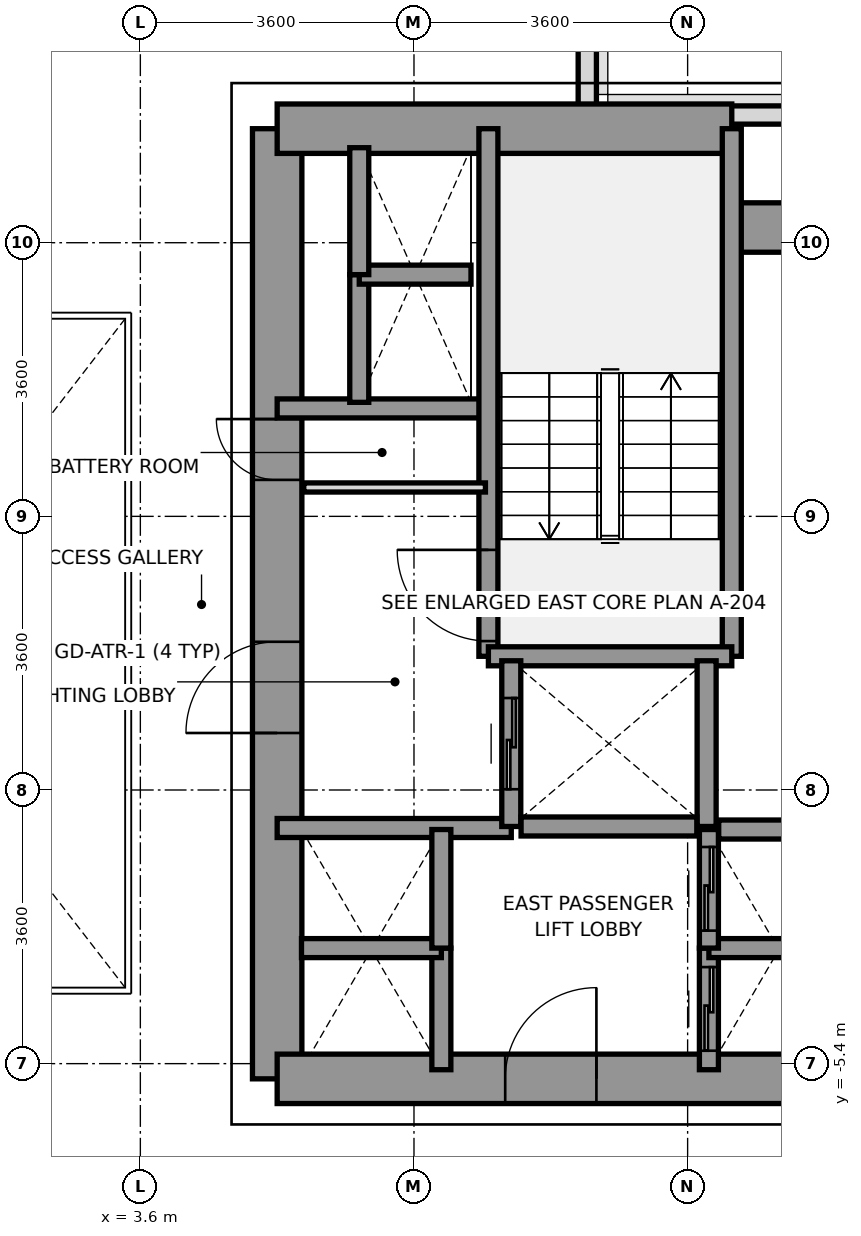
"""IFC4 building model, lengths in metres.
Left out: names, types, materials, properties, quantities, classifications, styles, units other than length and angle.
Written with IfcOpenShell. Run it as: python <this file> out.ifc"""

import sys

from ifc_helpers import new_model, si_unit, direction, frame, frame_2d, origin, place, context, subcontext, project, spatial, rectangle, extrude, source, transform, mapped, element, fill, save


model = new_model("IFC4")
c1 = context("Model", 3, precision=1e-05, world=origin(), true_north=direction((0.0, 1.0)))
c2 = subcontext(c1, "Body", "Model", "MODEL_VIEW")
j1 = project(units=[si_unit("LENGTHUNIT", "METRE"), si_unit("PLANEANGLEUNIT", "RADIAN")], contexts=[c1])
p1 = place(None, origin())
s1 = spatial("IfcSite", under=j1, at=p1, CompositionType="ELEMENT")
p2 = place(p1, origin())
s2 = spatial("IfcBuilding", under=s1, at=p2, CompositionType="ELEMENT")
p3 = place(p2, frame((0.0, 0.0, 25.2)))
s3 = spatial("IfcBuildingStorey", under=s2, at=p3, CompositionType="ELEMENT", Elevation=25.2)
p4 = place(p3, frame((9.48, 8.789, 0.0), z_axis=(0.0, 0.0, 1.0), x_axis=(0.0, -1.0, 0.0)))
e1 = element("IfcWall", 1, at=p4, inside=s3, PredefinedType="PARAPET", context=c2, shape_type="SweptSolid", body=[
    extrude(rectangle(XDim=1.836, YDim=0.24, at=frame_2d((0.918, 0.0))), origin(), (0.0, 0.0, 1.0), 1.15),
])
p5 = place(p3, frame((11.295, 7.08, 0.0), z_axis=(0.0, 0.0, 1.0), x_axis=(1.0, 0.0, 0.0)))
e2 = element("IfcWall", 2, at=p5, inside=s3, PredefinedType="PARAPET", context=c2, shape_type="SweptSolid", body=[
    extrude(rectangle(XDim=2.727, YDim=0.24, at=frame_2d((1.364, 0.0))), origin(), (0.0, 0.0, 1.0), 1.15),
])
p6 = place(p3, frame((5.4, -5.6, 0.0), z_axis=(0.0, 0.0, 1.0), x_axis=(0.0, 1.0, 0.0)))
e3 = element("IfcWall", 3, at=p6, inside=s3, PredefinedType="SHEAR", context=c2, shape_type="SweptSolid", body=[
    extrude(rectangle(XDim=12.5, YDim=0.65, at=frame_2d((6.25, 0.0))), origin(), (0.0, 0.0, 1.0), 5.2),
])
p7 = place(p6, frame((4.55, 0.0, 0.0)))
e4 = element("IfcOpeningElement", 4, at=p7, cuts=e3, PredefinedType="OPENING", context=c2, shape_type="SweptSolid", body=[
    extrude(rectangle(XDim=1.2, YDim=2.2, at=frame_2d((0.6, 1.1))), frame((0.0, 0.335, 0.0), z_axis=(0.0, -1.0, 0.0), x_axis=(1.0, 0.0, 0.0)), (0.0, 0.0, 1.0), 0.67),
])
p8 = place(p6, frame((7.88, 0.0, 0.0)))
e5 = element("IfcOpeningElement", 5, at=p8, cuts=e3, PredefinedType="OPENING", context=c2, shape_type="SweptSolid", body=[
    extrude(rectangle(XDim=0.8, YDim=2.1, at=frame_2d((0.4, 1.05))), frame((0.0, 0.335, 0.0), z_axis=(0.0, -1.0, 0.0), x_axis=(1.0, 0.0, 0.0)), (0.0, 0.0, 1.0), 0.67),
])
p9 = place(p3, frame((5.4, 6.9, 0.0), z_axis=(0.0, 0.0, 1.0), x_axis=(1.0, 0.0, 0.0)))
e6 = element("IfcWall", 6, at=p9, inside=s3, PredefinedType="SHEAR", context=c2, shape_type="SweptSolid", body=[
    extrude(rectangle(XDim=5.981, YDim=0.65, at=frame_2d((2.991, 0.0))), origin(), (0.0, 0.0, 1.0), 5.2),
])
p10 = place(p3, frame((11.381, 5.6, 0.0), z_axis=(0.0, 0.0, 1.0), x_axis=(1.0, 0.0, 0.0)))
e7 = element("IfcWall", 7, at=p10, inside=s3, PredefinedType="SHEAR", context=c2, shape_type="SweptSolid", body=[
    extrude(rectangle(XDim=1.819, YDim=0.65, at=frame_2d((0.909, 0.0))), origin(), (0.0, 0.0, 1.0), 5.2),
])
p11 = place(p3, frame((5.4, -5.6, 0.0), z_axis=(0.0, 0.0, 1.0), x_axis=(1.0, 0.0, 0.0)))
e8 = element("IfcWall", 8, at=p11, inside=s3, PredefinedType="SHEAR", context=c2, shape_type="SweptSolid", body=[
    extrude(rectangle(XDim=7.8, YDim=0.65, at=frame_2d((3.9, 0.0))), origin(), (0.0, 0.0, 1.0), 5.2),
])
p12 = place(p11, frame((3.0, 0.0, 0.0)))
e9 = element("IfcOpeningElement", 9, at=p12, cuts=e8, PredefinedType="OPENING", context=c2, shape_type="SweptSolid", body=[
    extrude(rectangle(XDim=1.2, YDim=2.2, at=frame_2d((0.6, 1.1))), frame((0.0, 0.335, 0.0), z_axis=(0.0, -1.0, 0.0), x_axis=(1.0, 0.0, 0.0)), (0.0, 0.0, 1.0), 0.67),
])
p13 = place(p3, frame((5.4, 3.22, 0.0), z_axis=(0.0, 0.0, 1.0), x_axis=(1.0, 0.0, 0.0)))
e10 = element("IfcWall", 10, at=p13, inside=s3, PredefinedType="SOLIDWALL", context=c2, shape_type="SweptSolid", body=[
    extrude(rectangle(XDim=2.78, YDim=0.25, at=frame_2d((1.39, 0.0))), origin(), (0.0, 0.0, 1.0), 5.2),
])
p14 = place(p3, frame((5.4, -2.3, 0.0), z_axis=(0.0, 0.0, 1.0), x_axis=(1.0, 0.0, 0.0)))
e11 = element("IfcWall", 11, at=p14, inside=s3, PredefinedType="SOLIDWALL", context=c2, shape_type="SweptSolid", body=[
    extrude(rectangle(XDim=3.08, YDim=0.25, at=frame_2d((1.54, 0.0))), origin(), (0.0, 0.0, 1.0), 5.2),
])
p15 = place(p3, frame((8.179, -0.041, 0.0), z_axis=(0.0, 0.0, 1.0), x_axis=(0.0, 1.0, 0.0)))
e12 = element("IfcWall", 12, at=p15, inside=s3, PredefinedType="SOLIDWALL", context=c2, shape_type="SweptSolid", body=[
    extrude(rectangle(XDim=6.941, YDim=0.25, at=frame_2d((3.47, 0.0))), origin(), (0.0, 0.0, 1.0), 5.2),
])
p16 = place(p15, frame((0.2, 0.0, 0.0)))
e13 = element("IfcOpeningElement", 13, at=p16, cuts=e12, PredefinedType="OPENING", context=c2, shape_type="SweptSolid", body=[
    extrude(rectangle(XDim=1.2, YDim=2.2, at=frame_2d((0.6, 1.1))), frame((0.0, 0.135, 0.0), z_axis=(0.0, -1.0, 0.0), x_axis=(1.0, 0.0, 0.0)), (0.0, 0.0, 1.0), 0.27),
])
p17 = place(p3, frame((11.381, -0.041, 0.0), z_axis=(0.0, 0.0, 1.0), x_axis=(0.0, 1.0, 0.0)))
e14 = element("IfcWall", 14, at=p17, inside=s3, PredefinedType="SOLIDWALL", context=c2, shape_type="SweptSolid", body=[
    extrude(rectangle(XDim=6.941, YDim=0.25, at=frame_2d((3.47, 0.0))), origin(), (0.0, 0.0, 1.0), 5.2),
])
p18 = place(p3, frame((8.179, -0.041, 0.0), z_axis=(0.0, 0.0, 1.0), x_axis=(1.0, 0.0, 0.0)))
e15 = element("IfcWall", 15, at=p18, inside=s3, PredefinedType="SOLIDWALL", context=c2, shape_type="SweptSolid", body=[
    extrude(rectangle(XDim=3.202, YDim=0.25, at=frame_2d((1.601, 0.0))), origin(), (0.0, 0.0, 1.0), 5.2),
])
p19 = place(p3, frame((8.48, -2.28, 0.0), z_axis=(0.0, 0.0, 1.0), x_axis=(0.0, 1.0, 0.0)))
e16 = element("IfcWall", 16, at=p19, inside=s3, PredefinedType="SOLIDWALL", context=c2, shape_type="SweptSolid", body=[
    extrude(rectangle(XDim=2.18, YDim=0.25, at=frame_2d((1.09, 0.0))), origin(), (0.0, 0.0, 1.0), 5.2),
])
p20 = place(p19, frame((0.49, 0.0, 0.0)))
e17 = element("IfcOpeningElement", 17, at=p20, cuts=e16, PredefinedType="OPENING", context=c2, shape_type="SweptSolid", body=[
    extrude(rectangle(XDim=1.2, YDim=2.2, at=frame_2d((0.6, 1.1))), frame((0.0, 0.135, 0.0), z_axis=(0.0, -1.0, 0.0), x_axis=(1.0, 0.0, 0.0)), (0.0, 0.0, 1.0), 0.27),
])
p21 = place(p3, frame((11.05, -2.28, 0.0), z_axis=(0.0, 0.0, 1.0), x_axis=(0.0, 1.0, 0.0)))
e18 = element("IfcWall", 18, at=p21, inside=s3, PredefinedType="SOLIDWALL", context=c2, shape_type="SweptSolid", body=[
    extrude(rectangle(XDim=2.18, YDim=0.25, at=frame_2d((1.09, 0.0))), origin(), (0.0, 0.0, 1.0), 5.2),
])
p22 = place(p3, frame((8.609, -2.28, 0.0), z_axis=(0.0, 0.0, 1.0), x_axis=(1.0, 0.0, 0.0)))
e19 = element("IfcWall", 19, at=p22, inside=s3, PredefinedType="SOLIDWALL", context=c2, shape_type="SweptSolid", body=[
    extrude(rectangle(XDim=2.312, YDim=0.25, at=frame_2d((1.156, 0.0))), origin(), (0.0, 0.0, 1.0), 5.2),
])
p23 = place(p3, frame((11.08, -5.48, 0.0), z_axis=(0.0, 0.0, 1.0), x_axis=(0.0, 1.0, 0.0)))
e20 = element("IfcWall", 20, at=p23, inside=s3, PredefinedType="SOLIDWALL", context=c2, shape_type="SweptSolid", body=[
    extrude(rectangle(XDim=1.6, YDim=0.25, at=frame_2d((0.8, 0.0))), origin(), (0.0, 0.0, 1.0), 5.2),
])
p24 = place(p23, frame((0.25, 0.0, 0.0)))
e21 = element("IfcOpeningElement", 21, at=p24, cuts=e20, PredefinedType="OPENING", context=c2, shape_type="SweptSolid", body=[
    extrude(rectangle(XDim=1.1, YDim=2.2, at=frame_2d((0.55, 1.1))), frame((0.0, 0.135, 0.0), z_axis=(0.0, -1.0, 0.0), x_axis=(1.0, 0.0, 0.0)), (0.0, 0.0, 1.0), 0.27),
])
p25 = place(p3, frame((11.08, -3.88, 0.0), z_axis=(0.0, 0.0, 1.0), x_axis=(1.0, 0.0, 0.0)))
e22 = element("IfcWall", 22, at=p25, inside=s3, PredefinedType="SOLIDWALL", context=c2, shape_type="SweptSolid", body=[
    extrude(rectangle(XDim=1.84, YDim=0.25, at=frame_2d((0.92, 0.0))), origin(), (0.0, 0.0, 1.0), 5.2),
])
p26 = place(p3, frame((11.08, -3.88, 0.0), z_axis=(0.0, 0.0, 1.0), x_axis=(0.0, 1.0, 0.0)))
e23 = element("IfcWall", 23, at=p26, inside=s3, PredefinedType="SOLIDWALL", context=c2, shape_type="SweptSolid", body=[
    extrude(rectangle(XDim=1.56, YDim=0.25, at=frame_2d((0.78, 0.0))), origin(), (0.0, 0.0, 1.0), 5.2),
])
p27 = place(p26, frame((0.23, 0.0, 0.0)))
e24 = element("IfcOpeningElement", 24, at=p27, cuts=e23, PredefinedType="OPENING", context=c2, shape_type="SweptSolid", body=[
    extrude(rectangle(XDim=1.1, YDim=2.2, at=frame_2d((0.55, 1.1))), frame((0.0, 0.135, 0.0), z_axis=(0.0, -1.0, 0.0), x_axis=(1.0, 0.0, 0.0)), (0.0, 0.0, 1.0), 0.27),
])
p28 = place(p3, frame((11.209, -2.32, 0.0), z_axis=(0.0, 0.0, 1.0), x_axis=(1.0, 0.0, 0.0)))
e25 = element("IfcWall", 25, at=p28, inside=s3, PredefinedType="SOLIDWALL", context=c2, shape_type="SweptSolid", body=[
    extrude(rectangle(XDim=1.582, YDim=0.25, at=frame_2d((0.791, 0.0))), origin(), (0.0, 0.0, 1.0), 5.2),
])
p29 = place(p3, frame((7.56, -5.48, 0.0), z_axis=(0.0, 0.0, 1.0), x_axis=(0.0, 1.0, 0.0)))
e26 = element("IfcWall", 26, at=p29, inside=s3, PredefinedType="SOLIDWALL", context=c2, shape_type="SweptSolid", body=[
    extrude(rectangle(XDim=1.6, YDim=0.25, at=frame_2d((0.8, 0.0))), origin(), (0.0, 0.0, 1.0), 5.2),
])
p30 = place(p3, frame((5.72, -3.88, 0.0), z_axis=(0.0, 0.0, 1.0), x_axis=(1.0, 0.0, 0.0)))
e27 = element("IfcWall", 27, at=p30, inside=s3, PredefinedType="SOLIDWALL", context=c2, shape_type="SweptSolid", body=[
    extrude(rectangle(XDim=1.84, YDim=0.25, at=frame_2d((0.92, 0.0))), origin(), (0.0, 0.0, 1.0), 5.2),
])
p31 = place(p3, frame((7.56, -3.88, 0.0), z_axis=(0.0, 0.0, 1.0), x_axis=(0.0, 1.0, 0.0)))
e28 = element("IfcWall", 28, at=p31, inside=s3, PredefinedType="SOLIDWALL", context=c2, shape_type="SweptSolid", body=[
    extrude(rectangle(XDim=1.56, YDim=0.25, at=frame_2d((0.78, 0.0))), origin(), (0.0, 0.0, 1.0), 5.2),
])
p32 = place(p3, frame((6.48, 3.3, 0.0), z_axis=(0.0, 0.0, 1.0), x_axis=(0.0, 1.0, 0.0)))
e29 = element("IfcWall", 29, at=p32, inside=s3, PredefinedType="SOLIDWALL", context=c2, shape_type="SweptSolid", body=[
    extrude(rectangle(XDim=1.68, YDim=0.25, at=frame_2d((0.84, 0.0))), origin(), (0.0, 0.0, 1.0), 5.2),
])
p33 = place(p3, frame((6.48, 4.98, 0.0), z_axis=(0.0, 0.0, 1.0), x_axis=(1.0, 0.0, 0.0)))
e30 = element("IfcWall", 30, at=p33, inside=s3, PredefinedType="SOLIDWALL", context=c2, shape_type="SweptSolid", body=[
    extrude(rectangle(XDim=1.47, YDim=0.25, at=frame_2d((0.735, 0.0))), origin(), (0.0, 0.0, 1.0), 5.2),
])
p34 = place(p3, frame((6.48, 4.98, 0.0), z_axis=(0.0, 0.0, 1.0), x_axis=(0.0, 1.0, 0.0)))
e31 = element("IfcWall", 31, at=p34, inside=s3, PredefinedType="SOLIDWALL", context=c2, shape_type="SweptSolid", body=[
    extrude(rectangle(XDim=1.67, YDim=0.25, at=frame_2d((0.835, 0.0))), origin(), (0.0, 0.0, 1.0), 5.2),
])
p35 = place(p3, frame((5.75, 2.18, 0.0), z_axis=(0.0, 0.0, 1.0), x_axis=(1.0, 0.0, 0.0)))
e32 = element("IfcWall", 32, at=p35, inside=s3, PredefinedType="PARTITIONING", context=c2, shape_type="SweptSolid", body=[
    extrude(rectangle(XDim=2.39, YDim=0.12, at=frame_2d((1.195, 0.0))), origin(), (0.0, 0.0, 1.0), 4.3),
])
m1 = source(origin(), c2, "Body", "SweptSolid", [
    extrude(rectangle(XDim=1.2, YDim=2.2, at=frame_2d((0.6, 1.1))), frame((0.0, 0.025, 0.0), z_axis=(0.0, -1.0, 0.0), x_axis=(1.0, 0.0, 0.0)), (0.0, 0.0, 1.0), 0.05),
])
p36 = place(p16, origin())
e33 = element("IfcDoor", 33, at=p36, inside=s3, OperationType="SINGLE_SWING_RIGHT", PredefinedType="DOOR", context=c2, shape_type="MappedRepresentation", body=[
    mapped(m1, transform((0.0, 0.0, 0.0), x_axis=(1.0, 0.0, 0.0), y_axis=(0.0, 1.0, 0.0), z_axis=(0.0, 0.0, 1.0), scale=1.0)),
])
fill(e13, e33)
p37 = place(p7, origin())
e34 = element("IfcDoor", 34, at=p37, inside=s3, OperationType="SINGLE_SWING_LEFT", PredefinedType="DOOR", context=c2, shape_type="MappedRepresentation", body=[
    mapped(m1, transform((0.0, 0.0, 0.0), x_axis=(1.0, 0.0, 0.0), y_axis=(0.0, 1.0, 0.0), z_axis=(0.0, 0.0, 1.0), scale=1.0)),
])
fill(e4, e34)
p38 = place(p12, origin())
e35 = element("IfcDoor", 35, at=p38, inside=s3, OperationType="SINGLE_SWING_RIGHT", PredefinedType="DOOR", context=c2, shape_type="MappedRepresentation", body=[
    mapped(m1, transform((0.0, 0.0, 0.0), x_axis=(1.0, 0.0, 0.0), y_axis=(0.0, 1.0, 0.0), z_axis=(0.0, 0.0, 1.0), scale=1.0)),
])
fill(e9, e35)
m2 = source(origin(), c2, "Body", "SweptSolid", [
    extrude(rectangle(XDim=0.8, YDim=2.1, at=frame_2d((0.4, 1.05))), frame((0.0, 0.025, 0.0), z_axis=(0.0, -1.0, 0.0), x_axis=(1.0, 0.0, 0.0)), (0.0, 0.0, 1.0), 0.05),
])
p39 = place(p8, origin())
e36 = element("IfcDoor", 36, at=p39, inside=s3, OperationType="SINGLE_SWING_RIGHT", PredefinedType="DOOR", context=c2, shape_type="MappedRepresentation", body=[
    mapped(m2, transform((0.0, 0.0, 0.0), x_axis=(1.0, 0.0, 0.0), y_axis=(0.0, 1.0, 0.0), z_axis=(0.0, 0.0, 1.0), scale=1.0)),
])
fill(e5, e36)
p40 = place(p20, origin())
e37 = element("IfcDoor", 37, at=p40, inside=s3, OperationType="SLIDING_TO_RIGHT", PredefinedType="DOOR", context=c2, shape_type="MappedRepresentation", body=[
    mapped(m1, transform((0.0, 0.0, 0.0), x_axis=(1.0, 0.0, 0.0), y_axis=(0.0, 1.0, 0.0), z_axis=(0.0, 0.0, 1.0), scale=1.0)),
])
fill(e17, e37)
m3 = source(origin(), c2, "Body", "SweptSolid", [
    extrude(rectangle(XDim=1.1, YDim=2.2, at=frame_2d((0.55, 1.1))), frame((0.0, 0.025, 0.0), z_axis=(0.0, -1.0, 0.0), x_axis=(1.0, 0.0, 0.0)), (0.0, 0.0, 1.0), 0.05),
])
p41 = place(p24, origin())
e38 = element("IfcDoor", 38, at=p41, inside=s3, OperationType="SLIDING_TO_LEFT", PredefinedType="DOOR", context=c2, shape_type="MappedRepresentation", body=[
    mapped(m3, transform((0.0, 0.0, 0.0), x_axis=(1.0, 0.0, 0.0), y_axis=(0.0, 1.0, 0.0), z_axis=(0.0, 0.0, 1.0), scale=1.0)),
])
fill(e21, e38)
p42 = place(p27, origin())
e39 = element("IfcDoor", 39, at=p42, inside=s3, OperationType="SLIDING_TO_LEFT", PredefinedType="DOOR", context=c2, shape_type="MappedRepresentation", body=[
    mapped(m3, transform((0.0, 0.0, 0.0), x_axis=(1.0, 0.0, 0.0), y_axis=(0.0, 1.0, 0.0), z_axis=(0.0, 0.0, 1.0), scale=1.0)),
])
fill(e24, e39)
save(model, sys.argv[1])
